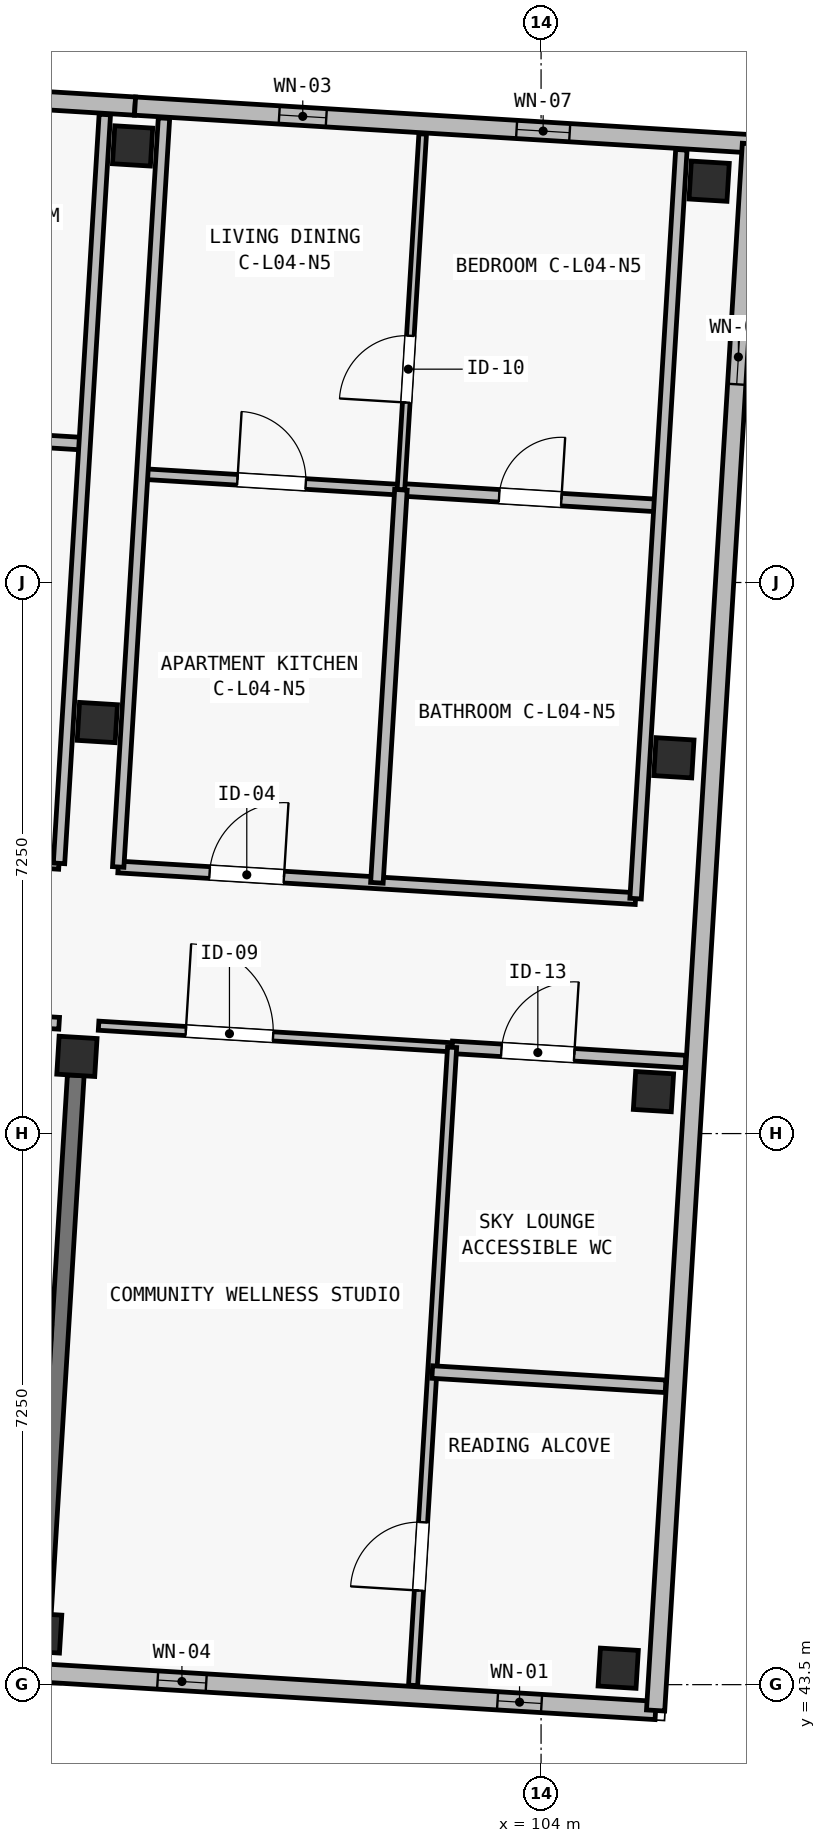
"""IFC4 building model, lengths in metres.
Left out: names, types, materials, properties, quantities, classifications, styles, units other than length and angle.
Written with IfcOpenShell. Run it as: python <this file> out.ifc"""

import sys

from ifc_helpers import new_model, si_unit, direction, frame, frame_2d, origin, origin_2d, place, context, subcontext, project, spatial, rectangle, extrude, element, fill, save


model = new_model("IFC4")
c1 = context("Model", 3, precision=1e-05, world=origin(), true_north=direction((0.0, 1.0)))
c2 = subcontext(c1, "Body", "Model", "MODEL_VIEW")
j1 = project(units=[si_unit("LENGTHUNIT", "METRE"), si_unit("PLANEANGLEUNIT", "RADIAN")], contexts=[c1])
p1 = place(None, origin())
s1 = spatial("IfcSite", under=j1, at=p1, CompositionType="ELEMENT")
p2 = place(p1, origin())
s2 = spatial("IfcBuilding", under=s1, at=p2, CompositionType="ELEMENT")
p3 = place(p2, frame((0.0, 0.0, 14.9)))
s3 = spatial("IfcBuildingStorey", under=s2, at=p3, CompositionType="ELEMENT", Elevation=14.9)
for number, where, z_axis, x_axis in (
    (1, (97.429, 44.18, 0.0), (0.0, 0.0, 1.0), (0.998, -0.061, 0.0)),
    (2, (97.893, 51.766, 0.0), (0.0, 0.0, 1.0), (0.998, -0.061, 0.0)),
    (3, (98.162, 56.158, 0.0), (0.0, 0.0, 1.0), (0.998, -0.061, 0.0)),
    (4, (98.626, 63.744, 0.0), (0.0, 0.0, 1.0), (0.998, -0.061, 0.0)),
    (5, (105.015, 43.716, 0.0), (0.0, 0.0, 1.0), (0.998, -0.061, 0.0)),
    (6, (105.479, 51.302, 0.0), (0.0, 0.0, 1.0), (0.998, -0.061, 0.0)),
    (7, (105.748, 55.694, 0.0), (0.0, 0.0, 1.0), (0.998, -0.061, 0.0)),
    (8, (106.211, 63.28, 0.0), (0.0, 0.0, 1.0), (0.998, -0.061, 0.0)),
):
    element("IfcColumn", number, at=place(p3, frame(where, z_axis=z_axis, x_axis=x_axis)), inside=s3, PredefinedType="COLUMN", context=c2, shape_type="SweptSolid", body=[
        extrude(rectangle(XDim=0.5, YDim=0.5, at=origin_2d()), origin(), (0.0, 0.0, 1.0), 3.25),
    ])
p4 = place(p3, frame((97.444, 44.43, 0.0), z_axis=(0.0, 0.0, 1.0), x_axis=(0.061070212127, 0.998133472633, 0.0)))
e9 = element("IfcWall", 9, at=p4, inside=s3, PredefinedType="SHEAR", context=c2, shape_type="SweptSolid", body=[
    extrude(rectangle(XDim=7.1, YDim=0.22, at=frame_2d((3.55, 0.0))), origin(), (0.0, 0.0, 1.0), 2.5),
])
p5 = place(p3, frame((105.507, 43.16, 0.0), z_axis=(0.0, 0.0, 1.0), x_axis=(-0.998134248939, 0.061057522844, 0.0)))
e10 = element("IfcWall", 10, at=p5, inside=s3, PredefinedType="SOLIDWALL", context=c2, shape_type="SweptSolid", body=[
    extrude(rectangle(XDim=8.125, YDim=0.24, at=frame_2d((4.062, 0.0))), origin(), (0.0, 0.0, 1.0), 3.0),
])
p6 = place(p5, frame((1.503, 0.0, 0.42)))
e11 = element("IfcOpeningElement", 11, at=p6, cuts=e10, PredefinedType="OPENING", context=c2, shape_type="SweptSolid", body=[
    extrude(rectangle(XDim=0.58, YDim=2.16, at=frame_2d((0.29, 1.08))), frame((0.0, 0.135, 0.0), z_axis=(0.0, -1.0, 0.0), x_axis=(1.0, 0.0, 0.0)), (0.0, 0.0, 1.0), 0.27),
])
p7 = place(p5, frame((5.924, 0.0, 0.42)))
e12 = element("IfcOpeningElement", 12, at=p7, cuts=e10, PredefinedType="OPENING", context=c2, shape_type="SweptSolid", body=[
    extrude(rectangle(XDim=0.64, YDim=2.18, at=frame_2d((0.32, 1.09))), frame((0.0, 0.135, 0.0), z_axis=(0.0, -1.0, 0.0), x_axis=(1.0, 0.0, 0.0)), (0.0, 0.0, 1.0), 0.27),
])
p8 = place(p3, frame((91.072, 64.732, 0.0), z_axis=(0.0, 0.0, 1.0), x_axis=(0.998133591969, -0.061068261669, 0.0)))
e13 = element("IfcWall", 13, at=p8, inside=s3, PredefinedType="SOLIDWALL", context=c2, shape_type="SweptSolid", body=[
    extrude(rectangle(XDim=7.6, YDim=0.24, at=frame_2d((3.8, 0.0))), origin(), (0.0, 0.0, 1.0), 3.0),
])
p9 = place(p8, frame((0.902, 0.0, 0.44)))
e14 = element("IfcOpeningElement", 14, at=p9, cuts=e13, PredefinedType="OPENING", context=c2, shape_type="SweptSolid", body=[
    extrude(rectangle(XDim=0.78, YDim=2.2, at=frame_2d((0.39, 1.1))), frame((0.0, 0.135, 0.0), z_axis=(0.0, -1.0, 0.0), x_axis=(1.0, 0.0, 0.0)), (0.0, 0.0, 1.0), 0.27),
])
p10 = place(p8, frame((5.426, 0.0, 0.5)))
e15 = element("IfcOpeningElement", 15, at=p10, cuts=e13, PredefinedType="OPENING", context=c2, shape_type="SweptSolid", body=[
    extrude(rectangle(XDim=0.86, YDim=2.36, at=frame_2d((0.43, 1.18))), frame((0.0, 0.135, 0.0), z_axis=(0.0, -1.0, 0.0), x_axis=(1.0, 0.0, 0.0)), (0.0, 0.0, 1.0), 0.27),
])
p11 = place(p3, frame((98.658, 64.268, 0.0), z_axis=(0.0, 0.0, 1.0), x_axis=(0.998134248939, -0.061057522844, 0.0)))
e16 = element("IfcWall", 16, at=p11, inside=s3, PredefinedType="SOLIDWALL", context=c2, shape_type="SweptSolid", body=[
    extrude(rectangle(XDim=8.125, YDim=0.24, at=frame_2d((4.062, 0.0))), origin(), (0.0, 0.0, 1.0), 3.0),
])
p12 = place(p11, frame((1.901, 0.0, 0.5)))
e17 = element("IfcOpeningElement", 17, at=p12, cuts=e16, PredefinedType="OPENING", context=c2, shape_type="SweptSolid", body=[
    extrude(rectangle(XDim=0.62, YDim=2.28, at=frame_2d((0.31, 1.14))), frame((0.0, 0.135, 0.0), z_axis=(0.0, -1.0, 0.0), x_axis=(1.0, 0.0, 0.0)), (0.0, 0.0, 1.0), 0.27),
])
p13 = place(p11, frame((5.03, 0.0, 0.44)))
e18 = element("IfcOpeningElement", 18, at=p13, cuts=e16, PredefinedType="OPENING", context=c2, shape_type="SweptSolid", body=[
    extrude(rectangle(XDim=0.7, YDim=2.36, at=frame_2d((0.35, 1.18))), frame((0.0, 0.135, 0.0), z_axis=(0.0, -1.0, 0.0), x_axis=(1.0, 0.0, 0.0)), (0.0, 0.0, 1.0), 0.27),
])
p14 = place(p3, frame((106.768, 63.771, 0.0), z_axis=(0.0, 0.0, 1.0), x_axis=(-0.061053332998, -0.99813450523, 0.0)))
e19 = element("IfcWall", 19, at=p14, inside=s3, PredefinedType="SOLIDWALL", context=c2, shape_type="SweptSolid", body=[
    extrude(rectangle(XDim=20.65, YDim=0.24, at=frame_2d((10.325, 0.0))), origin(), (0.0, 0.0, 1.0), 3.0),
])
p15 = place(p14, frame((2.45, 0.0, 0.45)))
e20 = element("IfcOpeningElement", 20, at=p15, cuts=e19, PredefinedType="OPENING", context=c2, shape_type="SweptSolid", body=[
    extrude(rectangle(XDim=0.72, YDim=2.16, at=frame_2d((0.36, 1.08))), frame((0.0, 0.135, 0.0), z_axis=(0.0, -1.0, 0.0), x_axis=(1.0, 0.0, 0.0)), (0.0, 0.0, 1.0), 0.27),
])
p16 = place(p3, frame((90.593, 52.633, 0.0), z_axis=(0.0, 0.0, 1.0), x_axis=(0.998135538078, -0.061036445065, 0.0)))
e21 = element("IfcWall", 21, at=p16, inside=s3, PredefinedType="PARTITIONING", context=c2, shape_type="SweptSolid", body=[
    extrude(rectangle(XDim=7.08, YDim=0.155, at=frame_2d((3.54, 0.0))), origin(), (0.0, 0.0, 1.0), 2.97),
])
p17 = place(p16, frame((1.33, 0.0, 0.0)))
e22 = element("IfcOpeningElement", 22, at=p17, cuts=e21, PredefinedType="OPENING", context=c2, shape_type="SweptSolid", body=[
    extrude(rectangle(XDim=1.02, YDim=2.2, at=frame_2d((0.51, 1.1))), frame((0.0, 0.093, 0.0), z_axis=(0.0, -1.0, 0.0), x_axis=(1.0, 0.0, 0.0)), (0.0, 0.0, 1.0), 0.185),
])
p18 = place(p3, frame((98.178, 52.169, 0.0), z_axis=(0.0, 0.0, 1.0), x_axis=(0.998132468034, -0.061086629106, 0.0)))
e23 = element("IfcWall", 23, at=p18, inside=s3, PredefinedType="PARTITIONING", context=c2, shape_type="SweptSolid", body=[
    extrude(rectangle(XDim=4.66, YDim=0.12, at=frame_2d((2.33, 0.0))), origin(), (0.0, 0.0, 1.0), 2.97),
])
p19 = place(p18, frame((1.15, 0.0, 0.0)))
e24 = element("IfcOpeningElement", 24, at=p19, cuts=e23, PredefinedType="OPENING", context=c2, shape_type="SweptSolid", body=[
    extrude(rectangle(XDim=1.15, YDim=2.15, at=frame_2d((0.575, 1.075))), frame((0.0, 0.075, 0.0), z_axis=(0.0, -1.0, 0.0), x_axis=(1.0, 0.0, 0.0)), (0.0, 0.0, 1.0), 0.15),
])
p20 = place(p3, frame((102.83, 51.885, 0.0), z_axis=(0.0, 0.0, 1.0), x_axis=(0.998134491017, -0.061053565351, 0.0)))
e25 = element("IfcWall", 25, at=p20, inside=s3, PredefinedType="PLUMBINGWALL", context=c2, shape_type="SweptSolid", body=[
    extrude(rectangle(XDim=3.075, YDim=0.165, at=frame_2d((1.538, 0.0))), origin(), (0.0, 0.0, 1.0), 2.97),
])
p21 = place(p20, frame((0.65, 0.0, 0.0)))
e26 = element("IfcOpeningElement", 26, at=p21, cuts=e25, PredefinedType="OPENING", context=c2, shape_type="SweptSolid", body=[
    extrude(rectangle(XDim=0.96, YDim=2.12, at=frame_2d((0.48, 1.06))), frame((0.0, 0.097, 0.0), z_axis=(0.0, -1.0, 0.0), x_axis=(1.0, 0.0, 0.0)), (0.0, 0.0, 1.0), 0.195),
])
p22 = place(p3, frame((102.316, 43.49, 0.0), z_axis=(0.0, 0.0, 1.0), x_axis=(0.061049859271, 0.998134717702, 0.0)))
e27 = element("IfcWall", 27, at=p22, inside=s3, PredefinedType="PARTITIONING", context=c2, shape_type="SweptSolid", body=[
    extrude(rectangle(XDim=8.41, YDim=0.12, at=frame_2d((4.205, 0.0))), origin(), (0.0, 0.0, 1.0), 2.97),
])
p23 = place(p22, frame((1.25, 0.0, 0.0)))
e28 = element("IfcOpeningElement", 28, at=p23, cuts=e27, PredefinedType="OPENING", context=c2, shape_type="SweptSolid", body=[
    extrude(rectangle(XDim=0.9, YDim=2.1, at=frame_2d((0.45, 1.05))), frame((0.0, 0.075, 0.0), z_axis=(0.0, -1.0, 0.0), x_axis=(1.0, 0.0, 0.0)), (0.0, 0.0, 1.0), 0.15),
])
p24 = place(p3, frame((102.568, 47.613, 0.0), z_axis=(0.0, 0.0, 1.0), x_axis=(0.99813419504, -0.061058403944, 0.0)))
e29 = element("IfcWall", 29, at=p24, inside=s3, PredefinedType="PLUMBINGWALL", context=c2, shape_type="SweptSolid", body=[
    extrude(rectangle(XDim=3.075, YDim=0.165, at=frame_2d((1.537, 0.0))), origin(), (0.0, 0.0, 1.0), 2.97),
])
p25 = place(p3, frame((90.85, 54.721, 0.0), z_axis=(0.0, 0.0, 1.0), x_axis=(0.998135665032, -0.06103436893, 0.0)))
e30 = element("IfcWall", 30, at=p25, inside=s3, PredefinedType="PARTITIONING", context=c2, shape_type="SweptSolid", body=[
    extrude(rectangle(XDim=6.82, YDim=0.155, at=frame_2d((3.41, 0.0))), origin(), (0.0, 0.0, 1.0), 2.97),
])
p26 = place(p25, frame((1.205, 0.0, 0.0)))
e31 = element("IfcOpeningElement", 31, at=p26, cuts=e30, PredefinedType="OPENING", context=c2, shape_type="SweptSolid", body=[
    extrude(rectangle(XDim=1.02, YDim=2.2, at=frame_2d((0.51, 1.1))), frame((0.0, 0.093, 0.0), z_axis=(0.0, -1.0, 0.0), x_axis=(1.0, 0.0, 0.0)), (0.0, 0.0, 1.0), 0.185),
])
p27 = place(p3, frame((94.592, 60.033, 0.0), z_axis=(0.0, 0.0, 1.0), x_axis=(0.998133617109, -0.061067850767, 0.0)))
e32 = element("IfcWall", 32, at=p27, inside=s3, PredefinedType="PLUMBINGWALL", context=c2, shape_type="SweptSolid", body=[
    extrude(rectangle(XDim=3.41, YDim=0.165, at=frame_2d((1.705, 0.0))), origin(), (0.0, 0.0, 1.0), 2.97),
])
p28 = place(p27, frame((1.295, 0.0, 0.0)))
e33 = element("IfcOpeningElement", 33, at=p28, cuts=e32, PredefinedType="OPENING", context=c2, shape_type="SweptSolid", body=[
    extrude(rectangle(XDim=0.82, YDim=2.08, at=frame_2d((0.41, 1.04))), frame((0.0, 0.097, 0.0), z_axis=(0.0, -1.0, 0.0), x_axis=(1.0, 0.0, 0.0)), (0.0, 0.0, 1.0), 0.195),
])
p29 = place(p3, frame((97.658, 54.305, 0.0), z_axis=(0.0, 0.0, 1.0), x_axis=(0.061047700465, 0.998134849741, 0.0)))
e34 = element("IfcWall", 34, at=p29, inside=s3, PredefinedType="PARTITIONING", context=c2, shape_type="SweptSolid", body=[
    extrude(rectangle(XDim=9.87, YDim=0.15, at=frame_2d((4.935, 0.0))), origin(), (0.0, 0.0, 1.0), 2.97),
])
p30 = place(p3, frame((98.436, 54.258, 0.0), z_axis=(0.0, 0.0, 1.0), x_axis=(0.998133350094, -0.061072214879, 0.0)))
e35 = element("IfcWall", 35, at=p30, inside=s3, PredefinedType="PARTITIONING", context=c2, shape_type="SweptSolid", body=[
    extrude(rectangle(XDim=6.82, YDim=0.155, at=frame_2d((3.41, 0.0))), origin(), (0.0, 0.0, 1.0), 2.97),
])
p31 = place(p30, frame((1.205, 0.0, 0.0)))
e36 = element("IfcOpeningElement", 36, at=p31, cuts=e35, PredefinedType="OPENING", context=c2, shape_type="SweptSolid", body=[
    extrude(rectangle(XDim=0.98, YDim=2.15, at=frame_2d((0.49, 1.075))), frame((0.0, 0.093, 0.0), z_axis=(0.0, -1.0, 0.0), x_axis=(1.0, 0.0, 0.0)), (0.0, 0.0, 1.0), 0.185),
])
p32 = place(p3, frame((98.752, 59.428, 0.0), z_axis=(0.0, 0.0, 1.0), x_axis=(0.998137711988, -0.061000884486, 0.0)))
e37 = element("IfcWall", 37, at=p32, inside=s3, PredefinedType="PARTITIONING", context=c2, shape_type="SweptSolid", body=[
    extrude(rectangle(XDim=3.41, YDim=0.14, at=frame_2d((1.705, 0.0))), origin(), (0.0, 0.0, 1.0), 2.97),
])
p33 = place(p32, frame((1.255, 0.0, 0.0)))
e38 = element("IfcOpeningElement", 38, at=p33, cuts=e37, PredefinedType="OPENING", context=c2, shape_type="SweptSolid", body=[
    extrude(rectangle(XDim=0.9, YDim=2.1, at=frame_2d((0.45, 1.05))), frame((0.0, 0.085, 0.0), z_axis=(0.0, -1.0, 0.0), x_axis=(1.0, 0.0, 0.0)), (0.0, 0.0, 1.0), 0.17),
])
p34 = place(p3, frame((102.156, 59.22, 0.0), z_axis=(0.0, 0.0, 1.0), x_axis=(0.998133617109, -0.061067850767, 0.0)))
e39 = element("IfcWall", 39, at=p34, inside=s3, PredefinedType="PLUMBINGWALL", context=c2, shape_type="SweptSolid", body=[
    extrude(rectangle(XDim=3.41, YDim=0.165, at=frame_2d((1.705, 0.0))), origin(), (0.0, 0.0, 1.0), 2.97),
])
p35 = place(p34, frame((1.295, 0.0, 0.0)))
e40 = element("IfcOpeningElement", 40, at=p35, cuts=e39, PredefinedType="OPENING", context=c2, shape_type="SweptSolid", body=[
    extrude(rectangle(XDim=0.82, YDim=2.08, at=frame_2d((0.41, 1.04))), frame((0.0, 0.097, 0.0), z_axis=(0.0, -1.0, 0.0), x_axis=(1.0, 0.0, 0.0)), (0.0, 0.0, 1.0), 0.195),
])
p36 = place(p3, frame((102.156, 59.22, 0.0), z_axis=(0.0, 0.0, 1.0), x_axis=(0.061062434628, 0.998133948465, 0.0)))
e41 = element("IfcWall", 41, at=p36, inside=s3, PredefinedType="PARTITIONING", context=c2, shape_type="SweptSolid", body=[
    extrude(rectangle(XDim=4.69, YDim=0.1, at=frame_2d((2.345, 0.0))), origin(), (0.0, 0.0, 1.0), 2.97),
])
p37 = place(p36, frame((1.15, 0.0, 0.0)))
e42 = element("IfcOpeningElement", 42, at=p37, cuts=e41, PredefinedType="OPENING", context=c2, shape_type="SweptSolid", body=[
    extrude(rectangle(XDim=0.88, YDim=2.1, at=frame_2d((0.44, 1.05))), frame((0.0, 0.065, 0.0), z_axis=(0.0, -1.0, 0.0), x_axis=(1.0, 0.0, 0.0)), (0.0, 0.0, 1.0), 0.13),
])
p38 = place(p3, frame((101.84, 54.049, 0.0), z_axis=(0.0, 0.0, 1.0), x_axis=(0.06103436051, 0.998135665547, 0.0)))
e43 = element("IfcWall", 43, at=p38, inside=s3, PredefinedType="PLUMBINGWALL", context=c2, shape_type="SweptSolid", body=[
    extrude(rectangle(XDim=5.18, YDim=0.165, at=frame_2d((2.59, 0.0))), origin(), (0.0, 0.0, 1.0), 2.97),
])
for number, where, z_axis, x_axis in (
    (44, (98.436, 54.258, 0.0), (0.0, 0.0, 1.0), (0.061, 0.998, 0.0)),
    (45, (105.243, 53.841, 0.0), (0.0, 0.0, 1.0), (0.061, 0.998, 0.0)),
):
    element("IfcWall", number, at=place(p3, frame(where, z_axis=z_axis, x_axis=x_axis)), inside=s3, PredefinedType="PARTITIONING", context=c2, shape_type="SweptSolid", body=[
        extrude(rectangle(XDim=9.87, YDim=0.15, at=frame_2d((4.935, 0.0))), origin(), (0.0, 0.0, 1.0), 2.97),
    ])
p39 = place(p6, origin())
e46 = element("IfcWindow", 46, at=p39, inside=s3, PartitioningType="SINGLE_PANEL", PredefinedType="WINDOW", context=c2, shape_type="SweptSolid", body=[
    extrude(rectangle(XDim=0.58, YDim=2.16, at=frame_2d((0.29, 1.08))), frame((0.0, 0.03, 0.0), z_axis=(0.0, -1.0, 0.0), x_axis=(1.0, 0.0, 0.0)), (0.0, 0.0, 1.0), 0.06),
])
fill(e11, e46)
p40 = place(p7, origin())
e47 = element("IfcWindow", 47, at=p40, inside=s3, PartitioningType="SINGLE_PANEL", PredefinedType="WINDOW", context=c2, shape_type="SweptSolid", body=[
    extrude(rectangle(XDim=0.64, YDim=2.18, at=frame_2d((0.32, 1.09))), frame((0.0, 0.03, 0.0), z_axis=(0.0, -1.0, 0.0), x_axis=(1.0, 0.0, 0.0)), (0.0, 0.0, 1.0), 0.06),
])
fill(e12, e47)
p41 = place(p12, origin())
e48 = element("IfcWindow", 48, at=p41, inside=s3, PartitioningType="SINGLE_PANEL", PredefinedType="WINDOW", context=c2, shape_type="SweptSolid", body=[
    extrude(rectangle(XDim=0.62, YDim=2.28, at=frame_2d((0.31, 1.14))), frame((0.0, 0.03, 0.0), z_axis=(0.0, -1.0, 0.0), x_axis=(1.0, 0.0, 0.0)), (0.0, 0.0, 1.0), 0.06),
])
fill(e17, e48)
p42 = place(p13, origin())
e49 = element("IfcWindow", 49, at=p42, inside=s3, PartitioningType="SINGLE_PANEL", PredefinedType="WINDOW", context=c2, shape_type="SweptSolid", body=[
    extrude(rectangle(XDim=0.7, YDim=2.36, at=frame_2d((0.35, 1.18))), frame((0.0, 0.03, 0.0), z_axis=(0.0, -1.0, 0.0), x_axis=(1.0, 0.0, 0.0)), (0.0, 0.0, 1.0), 0.06),
])
fill(e18, e49)
p43 = place(p15, origin())
e50 = element("IfcWindow", 50, at=p43, inside=s3, PartitioningType="SINGLE_PANEL", PredefinedType="WINDOW", context=c2, shape_type="SweptSolid", body=[
    extrude(rectangle(XDim=0.72, YDim=2.16, at=frame_2d((0.36, 1.08))), frame((0.0, 0.03, 0.0), z_axis=(0.0, -1.0, 0.0), x_axis=(1.0, 0.0, 0.0)), (0.0, 0.0, 1.0), 0.06),
])
fill(e20, e50)
p44 = place(p19, origin())
e51 = element("IfcDoor", 51, at=p44, inside=s3, OperationType="SINGLE_SWING_LEFT", PredefinedType="DOOR", context=c2, shape_type="SweptSolid", body=[
    extrude(rectangle(XDim=1.15, YDim=2.15, at=frame_2d((0.575, 1.075))), frame((0.0, 0.025, 0.0), z_axis=(0.0, -1.0, 0.0), x_axis=(1.0, 0.0, 0.0)), (0.0, 0.0, 1.0), 0.05),
])
fill(e24, e51)
p45 = place(p21, origin())
e52 = element("IfcDoor", 52, at=p45, inside=s3, OperationType="SINGLE_SWING_RIGHT", PredefinedType="DOOR", context=c2, shape_type="SweptSolid", body=[
    extrude(rectangle(XDim=0.96, YDim=2.12, at=frame_2d((0.48, 1.06))), frame((0.0, 0.025, 0.0), z_axis=(0.0, -1.0, 0.0), x_axis=(1.0, 0.0, 0.0)), (0.0, 0.0, 1.0), 0.05),
])
fill(e26, e52)
p46 = place(p23, origin())
e53 = element("IfcDoor", 53, at=p46, inside=s3, OperationType="SINGLE_SWING_LEFT", PredefinedType="DOOR", context=c2, shape_type="SweptSolid", body=[
    extrude(rectangle(XDim=0.9, YDim=2.1, at=frame_2d((0.45, 1.05))), frame((0.0, 0.025, 0.0), z_axis=(0.0, -1.0, 0.0), x_axis=(1.0, 0.0, 0.0)), (0.0, 0.0, 1.0), 0.05),
])
fill(e28, e53)
p47 = place(p31, origin())
e54 = element("IfcDoor", 54, at=p47, inside=s3, OperationType="SINGLE_SWING_RIGHT", PredefinedType="DOOR", context=c2, shape_type="SweptSolid", body=[
    extrude(rectangle(XDim=0.98, YDim=2.15, at=frame_2d((0.49, 1.075))), frame((0.0, 0.025, 0.0), z_axis=(0.0, -1.0, 0.0), x_axis=(1.0, 0.0, 0.0)), (0.0, 0.0, 1.0), 0.05),
])
fill(e36, e54)
p48 = place(p33, origin())
e55 = element("IfcDoor", 55, at=p48, inside=s3, OperationType="SINGLE_SWING_LEFT", PredefinedType="DOOR", context=c2, shape_type="SweptSolid", body=[
    extrude(rectangle(XDim=0.9, YDim=2.1, at=frame_2d((0.45, 1.05))), frame((0.0, 0.025, 0.0), z_axis=(0.0, -1.0, 0.0), x_axis=(1.0, 0.0, 0.0)), (0.0, 0.0, 1.0), 0.05),
])
fill(e38, e55)
p49 = place(p35, origin())
e56 = element("IfcDoor", 56, at=p49, inside=s3, OperationType="SINGLE_SWING_RIGHT", PredefinedType="DOOR", context=c2, shape_type="SweptSolid", body=[
    extrude(rectangle(XDim=0.82, YDim=2.08, at=frame_2d((0.41, 1.04))), frame((0.0, 0.025, 0.0), z_axis=(0.0, -1.0, 0.0), x_axis=(1.0, 0.0, 0.0)), (0.0, 0.0, 1.0), 0.05),
])
fill(e40, e56)
p50 = place(p37, origin())
e57 = element("IfcDoor", 57, at=p50, inside=s3, OperationType="SINGLE_SWING_LEFT", PredefinedType="DOOR", context=c2, shape_type="SweptSolid", body=[
    extrude(rectangle(XDim=0.88, YDim=2.1, at=frame_2d((0.44, 1.05))), frame((0.0, 0.025, 0.0), z_axis=(0.0, -1.0, 0.0), x_axis=(1.0, 0.0, 0.0)), (0.0, 0.0, 1.0), 0.05),
])
fill(e42, e57)
save(model, sys.argv[1])
